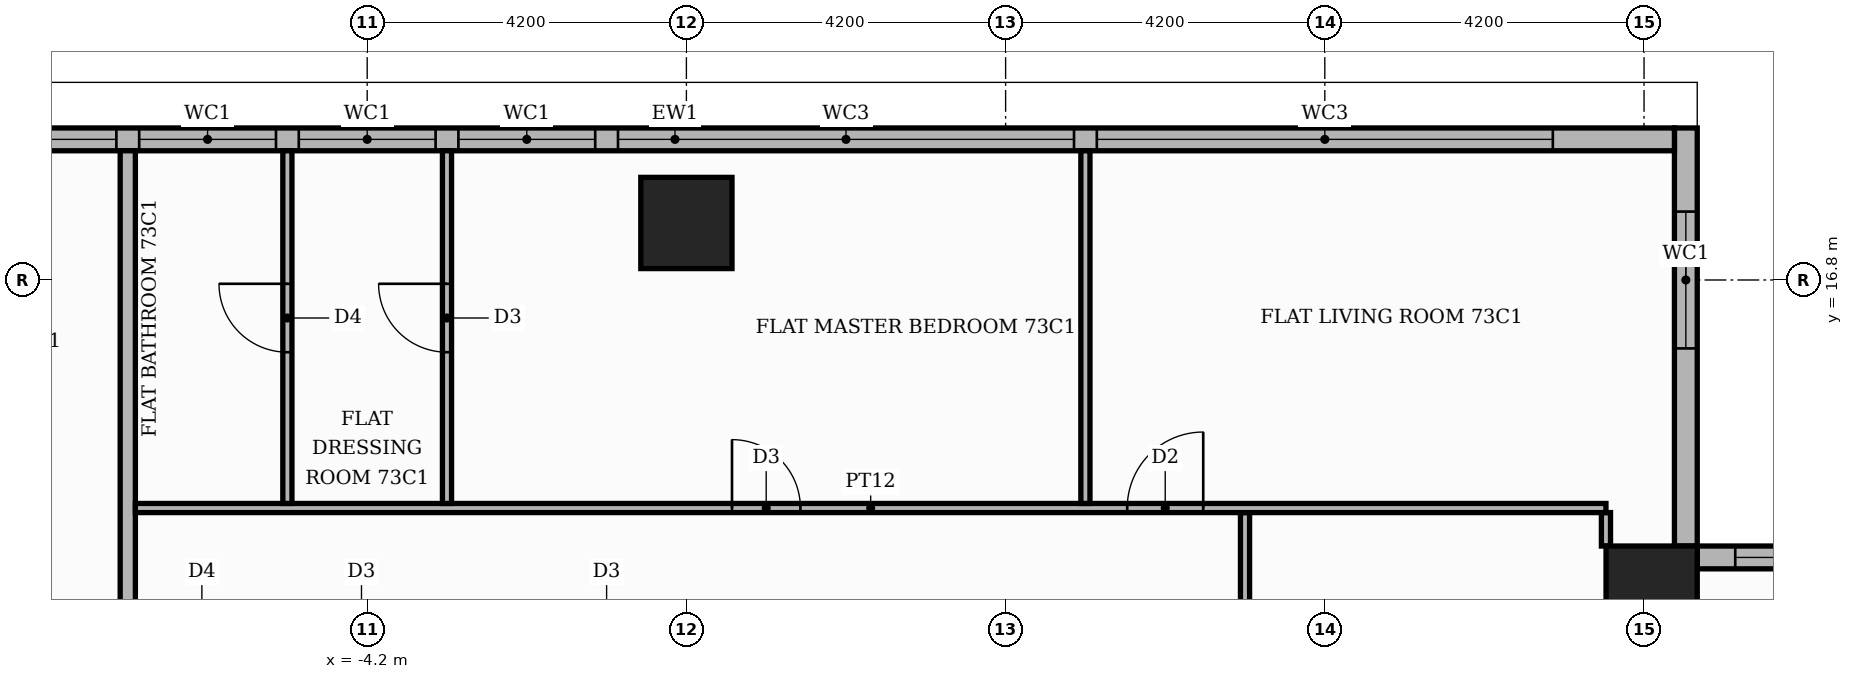
"""IFC4 building model, lengths in metres.
Left out: names, types, materials, properties, quantities, classifications, styles, units other than length and angle.
Written with IfcOpenShell. Run it as: python <this file> out.ifc"""

import sys

from ifc_helpers import new_model, si_unit, direction, frame, frame_2d, origin, origin_2d, place, context, subcontext, project, spatial, rectangle, extrude, element, fill, save


model = new_model("IFC4")
c1 = context("Model", 3, precision=1e-05, world=origin(), true_north=direction((0.0, 1.0)))
c2 = subcontext(c1, "Body", "Model", "MODEL_VIEW")
j1 = project(units=[si_unit("LENGTHUNIT", "METRE"), si_unit("PLANEANGLEUNIT", "RADIAN")], contexts=[c1])
p1 = place(None, origin())
s1 = spatial("IfcSite", under=j1, at=p1, CompositionType="ELEMENT")
p2 = place(p1, origin())
s2 = spatial("IfcBuilding", under=s1, at=p2, CompositionType="ELEMENT")
p3 = place(p2, frame((0.0, 0.0, 304.5)))
s3 = spatial("IfcBuildingStorey", under=s2, at=p3, CompositionType="ELEMENT", Elevation=304.5)
for number, where, z_axis, x_axis in (
    (1, (12.7, 12.7, 0.0), (0.0, 0.0, 1.0), (1.0, 0.0, 0.0)),
    (2, (0.0, 17.55, 0.0), (0.0, 0.0, 1.0), (1.0, 0.0, 0.0)),
):
    element("IfcColumn", number, at=place(p3, frame(where, z_axis=z_axis, x_axis=x_axis)), inside=s3, PredefinedType="COLUMN", context=c2, shape_type="SweptSolid", body=[
        extrude(rectangle(XDim=1.2, YDim=1.2, at=origin_2d()), origin(), (0.0, 0.0, 1.0), 3.9),
    ])
p4 = place(p3, frame((18.5, 13.15, 0.0), z_axis=(0.0, 0.0, 1.0), x_axis=(-1.0, 0.0, 0.0)))
e3 = element("IfcWall", 3, at=p4, inside=s3, PredefinedType="STANDARD", context=c2, shape_type="SweptSolid", body=[
    extrude(rectangle(XDim=5.2, YDim=0.3, at=frame_2d((2.6, 0.0))), origin(), (0.0, 0.0, 1.0), 3.55),
])
p5 = place(p4, frame((0.8, 0.0, 0.6)))
e4 = element("IfcOpeningElement", 4, at=p5, cuts=e3, PredefinedType="OPENING", context=c2, shape_type="SweptSolid", body=[
    extrude(rectangle(XDim=3.9, YDim=2.4, at=frame_2d((1.95, 1.2))), frame((0.0, 0.16, 0.0), z_axis=(0.0, -1.0, 0.0), x_axis=(1.0, 0.0, 0.0)), (0.0, 0.0, 1.0), 0.32),
])
p6 = place(p3, frame((13.15, 13.3, 0.0), z_axis=(0.0, 0.0, 1.0), x_axis=(0.0, 1.0, 0.0)))
e5 = element("IfcWall", 5, at=p6, inside=s3, PredefinedType="STANDARD", context=c2, shape_type="SweptSolid", body=[
    extrude(rectangle(XDim=5.5, YDim=0.3, at=frame_2d((2.75, 0.0))), origin(), (0.0, 0.0, 1.0), 3.55),
])
p7 = place(p6, frame((2.6, 0.0, 0.6)))
e6 = element("IfcOpeningElement", 6, at=p7, cuts=e5, PredefinedType="OPENING", context=c2, shape_type="SweptSolid", body=[
    extrude(rectangle(XDim=1.8, YDim=2.4, at=frame_2d((0.9, 1.2))), frame((0.0, 0.16, 0.0), z_axis=(0.0, -1.0, 0.0), x_axis=(1.0, 0.0, 0.0)), (0.0, 0.0, 1.0), 0.32),
])
p8 = place(p3, frame((13.0, 18.65, 0.0), z_axis=(0.0, 0.0, 1.0), x_axis=(-1.0, 0.0, 0.0)))
e7 = element("IfcWall", 7, at=p8, inside=s3, PredefinedType="STANDARD", context=c2, shape_type="SweptSolid", body=[
    extrude(rectangle(XDim=26.3, YDim=0.3, at=frame_2d((13.15, 0.0))), origin(), (0.0, 0.0, 1.0), 3.55),
])
p9 = place(p8, frame((1.6, 0.0, 0.6)))
e8 = element("IfcOpeningElement", 8, at=p9, cuts=e7, PredefinedType="OPENING", context=c2, shape_type="SweptSolid", body=[
    extrude(rectangle(XDim=6.0, YDim=2.4, at=frame_2d((3.0, 1.2))), frame((0.0, 0.16, 0.0), z_axis=(0.0, -1.0, 0.0), x_axis=(1.0, 0.0, 0.0)), (0.0, 0.0, 1.0), 0.32),
])
p10 = place(p8, frame((7.9, 0.0, 0.6)))
e9 = element("IfcOpeningElement", 9, at=p10, cuts=e7, PredefinedType="OPENING", context=c2, shape_type="SweptSolid", body=[
    extrude(rectangle(XDim=6.0, YDim=2.4, at=frame_2d((3.0, 1.2))), frame((0.0, 0.16, 0.0), z_axis=(0.0, -1.0, 0.0), x_axis=(1.0, 0.0, 0.0)), (0.0, 0.0, 1.0), 0.32),
])
p11 = place(p8, frame((14.2, 0.0, 0.6)))
e10 = element("IfcOpeningElement", 10, at=p11, cuts=e7, PredefinedType="OPENING", context=c2, shape_type="SweptSolid", body=[
    extrude(rectangle(XDim=1.8, YDim=2.4, at=frame_2d((0.9, 1.2))), frame((0.0, 0.16, 0.0), z_axis=(0.0, -1.0, 0.0), x_axis=(1.0, 0.0, 0.0)), (0.0, 0.0, 1.0), 0.32),
])
p12 = place(p8, frame((16.3, 0.0, 0.6)))
e11 = element("IfcOpeningElement", 11, at=p12, cuts=e7, PredefinedType="OPENING", context=c2, shape_type="SweptSolid", body=[
    extrude(rectangle(XDim=1.8, YDim=2.4, at=frame_2d((0.9, 1.2))), frame((0.0, 0.16, 0.0), z_axis=(0.0, -1.0, 0.0), x_axis=(1.0, 0.0, 0.0)), (0.0, 0.0, 1.0), 0.32),
])
p13 = place(p8, frame((18.4, 0.0, 0.6)))
e12 = element("IfcOpeningElement", 12, at=p13, cuts=e7, PredefinedType="OPENING", context=c2, shape_type="SweptSolid", body=[
    extrude(rectangle(XDim=1.8, YDim=2.4, at=frame_2d((0.9, 1.2))), frame((0.0, 0.16, 0.0), z_axis=(0.0, -1.0, 0.0), x_axis=(1.0, 0.0, 0.0)), (0.0, 0.0, 1.0), 0.32),
])
p14 = place(p8, frame((20.5, 0.0, 0.6)))
e13 = element("IfcOpeningElement", 13, at=p14, cuts=e7, PredefinedType="OPENING", context=c2, shape_type="SweptSolid", body=[
    extrude(rectangle(XDim=3.9, YDim=2.4, at=frame_2d((1.95, 1.2))), frame((0.0, 0.16, 0.0), z_axis=(0.0, -1.0, 0.0), x_axis=(1.0, 0.0, 0.0)), (0.0, 0.0, 1.0), 0.32),
])
p15 = place(p3, frame((-7.35, 7.45, 0.0), z_axis=(0.0, 0.0, 1.0), x_axis=(0.0, 1.0, 0.0)))
e14 = element("IfcWall", 14, at=p15, inside=s3, PredefinedType="PARTITIONING", context=c2, shape_type="SweptSolid", body=[
    extrude(rectangle(XDim=11.05, YDim=0.2, at=frame_2d((5.525, 0.0))), origin(), (0.0, 0.0, 1.0), 3.55),
])
p16 = place(p3, frame((7.35, 7.45, 0.0), z_axis=(0.0, 0.0, 1.0), x_axis=(0.0, 1.0, 0.0)))
e15 = element("IfcWall", 15, at=p16, inside=s3, PredefinedType="PARTITIONING", context=c2, shape_type="SweptSolid", body=[
    extrude(rectangle(XDim=6.29, YDim=0.12, at=frame_2d((3.145, 0.0))), origin(), (0.0, 0.0, 1.0), 3.55),
])
p17 = place(p16, frame((2.625, 0.0, 0.0)))
e16 = element("IfcOpeningElement", 16, at=p17, cuts=e15, PredefinedType="OPENING", context=c2, shape_type="SweptSolid", body=[
    extrude(rectangle(XDim=1.0, YDim=2.1, at=frame_2d((0.5, 1.05))), frame((0.0, 0.07, 0.0), z_axis=(0.0, -1.0, 0.0), x_axis=(1.0, 0.0, 0.0)), (0.0, 0.0, 1.0), 0.14),
])
p18 = place(p3, frame((12.099, 13.3, 0.0), z_axis=(0.0, 0.0, 1.0), x_axis=(0.0, 1.0, 0.0)))
e17 = element("IfcWall", 17, at=p18, inside=s3, PredefinedType="PARTITIONING", context=c2, shape_type="SweptSolid", body=[
    extrude(rectangle(XDim=0.44, YDim=0.12, at=frame_2d((0.22, 0.0))), origin(), (0.0, 0.0, 1.0), 3.55),
])
p19 = place(p3, frame((-7.25, 13.8, 0.0), z_axis=(0.0, 0.0, 1.0), x_axis=(1.0, 0.0, 0.0)))
e18 = element("IfcWall", 18, at=p19, inside=s3, PredefinedType="PARTITIONING", context=c2, shape_type="SweptSolid", body=[
    extrude(rectangle(XDim=19.349, YDim=0.12, at=frame_2d((9.675, 0.0))), origin(), (0.0, 0.0, 1.0), 3.55),
])
p20 = place(p19, frame((13.05, 0.0, 0.0)))
e19 = element("IfcOpeningElement", 19, at=p20, cuts=e18, PredefinedType="OPENING", context=c2, shape_type="SweptSolid", body=[
    extrude(rectangle(XDim=1.0, YDim=2.1, at=frame_2d((0.5, 1.05))), frame((0.0, 0.07, 0.0), z_axis=(0.0, -1.0, 0.0), x_axis=(1.0, 0.0, 0.0)), (0.0, 0.0, 1.0), 0.14),
])
p21 = place(p19, frame((7.85, 0.0, 0.0)))
e20 = element("IfcOpeningElement", 20, at=p21, cuts=e18, PredefinedType="OPENING", context=c2, shape_type="SweptSolid", body=[
    extrude(rectangle(XDim=0.9, YDim=2.1, at=frame_2d((0.45, 1.05))), frame((0.0, 0.07, 0.0), z_axis=(0.0, -1.0, 0.0), x_axis=(1.0, 0.0, 0.0)), (0.0, 0.0, 1.0), 0.14),
])
p22 = place(p3, frame((-5.25, 13.86, 0.0), z_axis=(0.0, 0.0, 1.0), x_axis=(0.0, 1.0, 0.0)))
e21 = element("IfcWall", 21, at=p22, inside=s3, PredefinedType="PARTITIONING", context=c2, shape_type="SweptSolid", body=[
    extrude(rectangle(XDim=4.64, YDim=0.12, at=frame_2d((2.32, 0.0))), origin(), (0.0, 0.0, 1.0), 3.55),
])
p23 = place(p22, frame((1.99, 0.0, 0.0)))
e22 = element("IfcOpeningElement", 22, at=p23, cuts=e21, PredefinedType="OPENING", context=c2, shape_type="SweptSolid", body=[
    extrude(rectangle(XDim=0.9, YDim=2.1, at=frame_2d((0.45, 1.05))), frame((0.0, 0.07, 0.0), z_axis=(0.0, -1.0, 0.0), x_axis=(1.0, 0.0, 0.0)), (0.0, 0.0, 1.0), 0.14),
])
p24 = place(p3, frame((-3.15, 13.86, 0.0), z_axis=(0.0, 0.0, 1.0), x_axis=(0.0, 1.0, 0.0)))
e23 = element("IfcWall", 23, at=p24, inside=s3, PredefinedType="PARTITIONING", context=c2, shape_type="SweptSolid", body=[
    extrude(rectangle(XDim=4.64, YDim=0.12, at=frame_2d((2.32, 0.0))), origin(), (0.0, 0.0, 1.0), 3.55),
])
p25 = place(p24, frame((1.99, 0.0, 0.0)))
e24 = element("IfcOpeningElement", 24, at=p25, cuts=e23, PredefinedType="OPENING", context=c2, shape_type="SweptSolid", body=[
    extrude(rectangle(XDim=0.9, YDim=2.1, at=frame_2d((0.45, 1.05))), frame((0.0, 0.07, 0.0), z_axis=(0.0, -1.0, 0.0), x_axis=(1.0, 0.0, 0.0)), (0.0, 0.0, 1.0), 0.14),
])
p26 = place(p3, frame((5.25, 13.86, 0.0), z_axis=(0.0, 0.0, 1.0), x_axis=(0.0, 1.0, 0.0)))
e25 = element("IfcWall", 25, at=p26, inside=s3, PredefinedType="PARTITIONING", context=c2, shape_type="SweptSolid", body=[
    extrude(rectangle(XDim=4.64, YDim=0.12, at=frame_2d((2.32, 0.0))), origin(), (0.0, 0.0, 1.0), 3.55),
])
p27 = place(p5, origin())
e26 = element("IfcWindow", 26, at=p27, inside=s3, PartitioningType="SINGLE_PANEL", PredefinedType="WINDOW", context=c2, shape_type="SweptSolid", body=[
    extrude(rectangle(XDim=3.9, YDim=2.4, at=frame_2d((1.95, 1.2))), frame((0.0, 0.03, 0.0), z_axis=(0.0, -1.0, 0.0), x_axis=(1.0, 0.0, 0.0)), (0.0, 0.0, 1.0), 0.06),
])
fill(e4, e26)
p28 = place(p7, origin())
e27 = element("IfcWindow", 27, at=p28, inside=s3, PartitioningType="SINGLE_PANEL", PredefinedType="WINDOW", context=c2, shape_type="SweptSolid", body=[
    extrude(rectangle(XDim=1.8, YDim=2.4, at=frame_2d((0.9, 1.2))), frame((0.0, 0.03, 0.0), z_axis=(0.0, -1.0, 0.0), x_axis=(1.0, 0.0, 0.0)), (0.0, 0.0, 1.0), 0.06),
])
fill(e6, e27)
p29 = place(p9, origin())
e28 = element("IfcWindow", 28, at=p29, inside=s3, PartitioningType="SINGLE_PANEL", PredefinedType="WINDOW", context=c2, shape_type="SweptSolid", body=[
    extrude(rectangle(XDim=6.0, YDim=2.4, at=frame_2d((3.0, 1.2))), frame((0.0, 0.03, 0.0), z_axis=(0.0, -1.0, 0.0), x_axis=(1.0, 0.0, 0.0)), (0.0, 0.0, 1.0), 0.06),
])
fill(e8, e28)
p30 = place(p10, origin())
e29 = element("IfcWindow", 29, at=p30, inside=s3, PartitioningType="SINGLE_PANEL", PredefinedType="WINDOW", context=c2, shape_type="SweptSolid", body=[
    extrude(rectangle(XDim=6.0, YDim=2.4, at=frame_2d((3.0, 1.2))), frame((0.0, 0.03, 0.0), z_axis=(0.0, -1.0, 0.0), x_axis=(1.0, 0.0, 0.0)), (0.0, 0.0, 1.0), 0.06),
])
fill(e9, e29)
p31 = place(p11, origin())
e30 = element("IfcWindow", 30, at=p31, inside=s3, PartitioningType="SINGLE_PANEL", PredefinedType="WINDOW", context=c2, shape_type="SweptSolid", body=[
    extrude(rectangle(XDim=1.8, YDim=2.4, at=frame_2d((0.9, 1.2))), frame((0.0, 0.03, 0.0), z_axis=(0.0, -1.0, 0.0), x_axis=(1.0, 0.0, 0.0)), (0.0, 0.0, 1.0), 0.06),
])
fill(e10, e30)
p32 = place(p12, origin())
e31 = element("IfcWindow", 31, at=p32, inside=s3, PartitioningType="SINGLE_PANEL", PredefinedType="WINDOW", context=c2, shape_type="SweptSolid", body=[
    extrude(rectangle(XDim=1.8, YDim=2.4, at=frame_2d((0.9, 1.2))), frame((0.0, 0.03, 0.0), z_axis=(0.0, -1.0, 0.0), x_axis=(1.0, 0.0, 0.0)), (0.0, 0.0, 1.0), 0.06),
])
fill(e11, e31)
p33 = place(p13, origin())
e32 = element("IfcWindow", 32, at=p33, inside=s3, PartitioningType="SINGLE_PANEL", PredefinedType="WINDOW", context=c2, shape_type="SweptSolid", body=[
    extrude(rectangle(XDim=1.8, YDim=2.4, at=frame_2d((0.9, 1.2))), frame((0.0, 0.03, 0.0), z_axis=(0.0, -1.0, 0.0), x_axis=(1.0, 0.0, 0.0)), (0.0, 0.0, 1.0), 0.06),
])
fill(e12, e32)
p34 = place(p14, origin())
e33 = element("IfcWindow", 33, at=p34, inside=s3, PartitioningType="SINGLE_PANEL", PredefinedType="WINDOW", context=c2, shape_type="SweptSolid", body=[
    extrude(rectangle(XDim=3.9, YDim=2.4, at=frame_2d((1.95, 1.2))), frame((0.0, 0.03, 0.0), z_axis=(0.0, -1.0, 0.0), x_axis=(1.0, 0.0, 0.0)), (0.0, 0.0, 1.0), 0.06),
])
fill(e13, e33)
p35 = place(p20, origin())
e34 = element("IfcDoor", 34, at=p35, inside=s3, OperationType="SINGLE_SWING_RIGHT", PredefinedType="DOOR", context=c2, shape_type="SweptSolid", body=[
    extrude(rectangle(XDim=1.0, YDim=2.1, at=frame_2d((0.5, 1.05))), frame((0.0, 0.025, 0.0), z_axis=(0.0, -1.0, 0.0), x_axis=(1.0, 0.0, 0.0)), (0.0, 0.0, 1.0), 0.05),
])
fill(e19, e34)
p36 = place(p21, origin())
e35 = element("IfcDoor", 35, at=p36, inside=s3, OperationType="SINGLE_SWING_LEFT", PredefinedType="DOOR", context=c2, shape_type="SweptSolid", body=[
    extrude(rectangle(XDim=0.9, YDim=2.1, at=frame_2d((0.45, 1.05))), frame((0.0, 0.025, 0.0), z_axis=(0.0, -1.0, 0.0), x_axis=(1.0, 0.0, 0.0)), (0.0, 0.0, 1.0), 0.05),
])
fill(e20, e35)
p37 = place(p25, origin())
e36 = element("IfcDoor", 36, at=p37, inside=s3, OperationType="SINGLE_SWING_RIGHT", PredefinedType="DOOR", context=c2, shape_type="SweptSolid", body=[
    extrude(rectangle(XDim=0.9, YDim=2.1, at=frame_2d((0.45, 1.05))), frame((0.0, 0.025, 0.0), z_axis=(0.0, -1.0, 0.0), x_axis=(1.0, 0.0, 0.0)), (0.0, 0.0, 1.0), 0.05),
])
fill(e24, e36)
p38 = place(p23, origin())
e37 = element("IfcDoor", 37, at=p38, inside=s3, OperationType="SINGLE_SWING_RIGHT", PredefinedType="DOOR", context=c2, shape_type="SweptSolid", body=[
    extrude(rectangle(XDim=0.9, YDim=2.1, at=frame_2d((0.45, 1.05))), frame((0.0, 0.025, 0.0), z_axis=(0.0, -1.0, 0.0), x_axis=(1.0, 0.0, 0.0)), (0.0, 0.0, 1.0), 0.05),
])
fill(e22, e37)
save(model, sys.argv[1])
